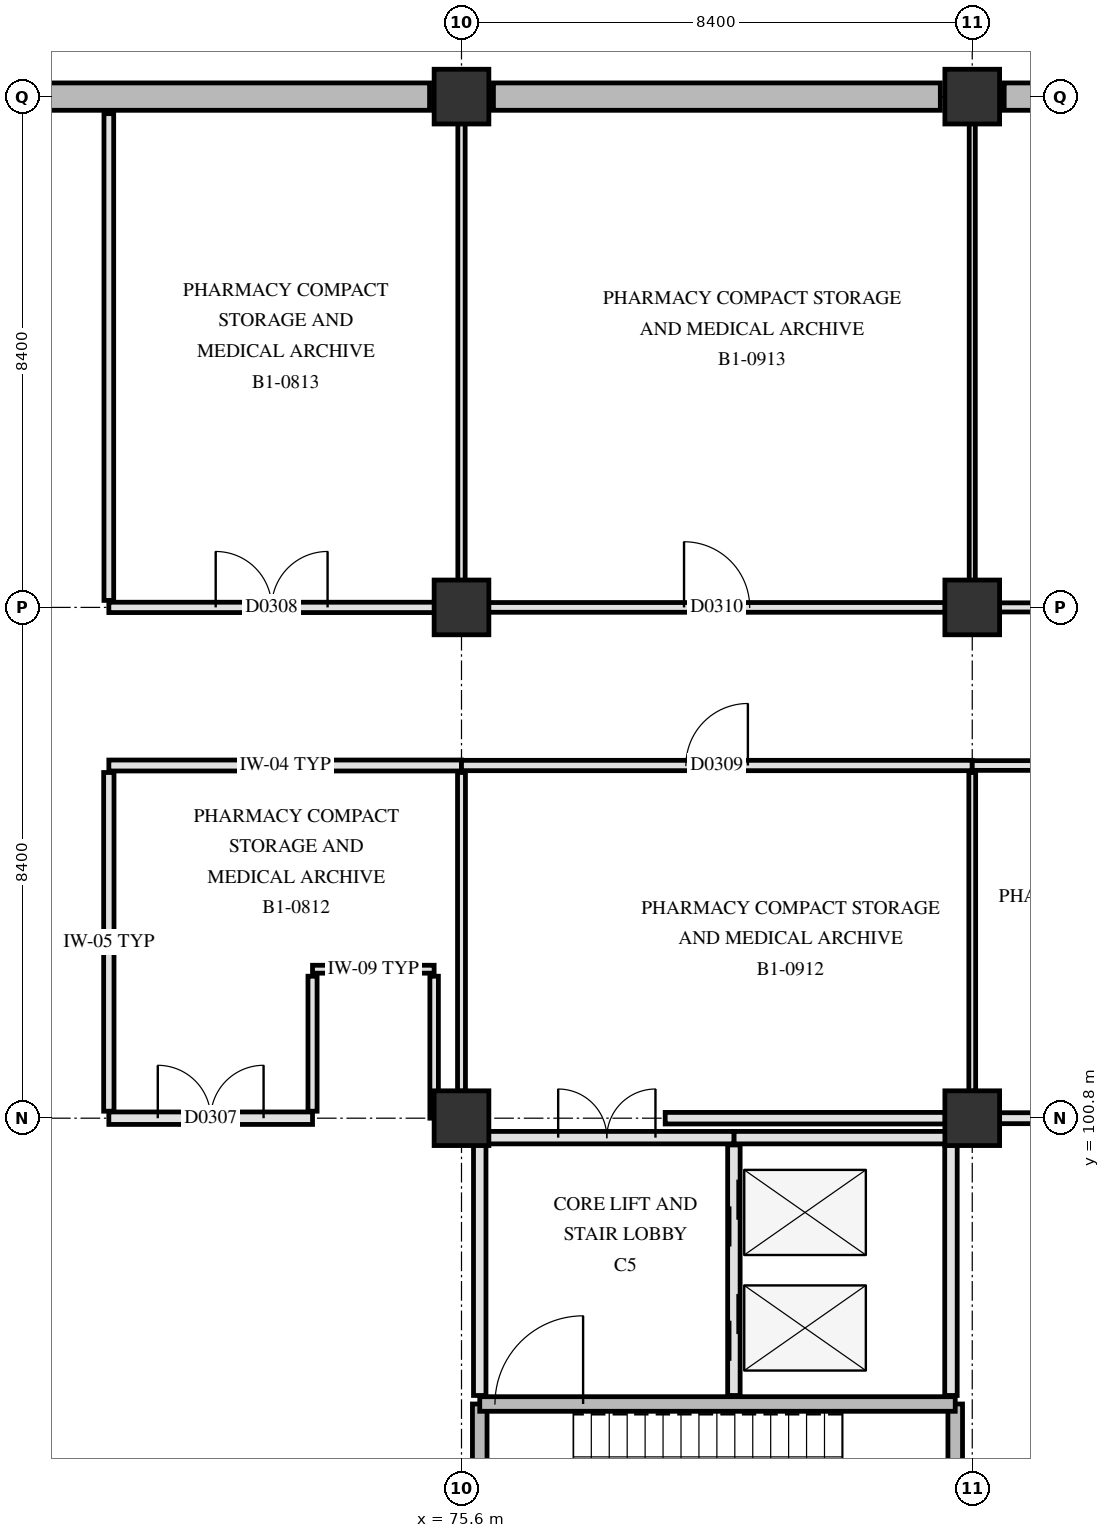
"""IFC4 building model, lengths in metres.
Left out: names, types, materials, properties, quantities, classifications, styles, units other than length and angle.
Written with IfcOpenShell. Run it as: python <this file> out.ifc"""

import sys

from ifc_helpers import new_model, si_unit, direction, frame, frame_2d, origin, origin_2d, place, context, subcontext, project, spatial, rectangle, extrude, element, fill, save


model = new_model("IFC4")
c1 = context("Model", 3, precision=1e-05, world=origin(), true_north=direction((0.0, 1.0)))
c2 = subcontext(c1, "Body", "Model", "MODEL_VIEW")
j1 = project(units=[si_unit("LENGTHUNIT", "METRE"), si_unit("PLANEANGLEUNIT", "RADIAN")], contexts=[c1])
p1 = place(None, origin())
s1 = spatial("IfcSite", under=j1, at=p1, CompositionType="ELEMENT")
p2 = place(p1, origin())
s2 = spatial("IfcBuilding", under=s1, at=p2, CompositionType="ELEMENT")
p3 = place(p2, frame((0.0, 0.0, -5.4)))
s3 = spatial("IfcBuildingStorey", under=s2, at=p3, CompositionType="ELEMENT", Elevation=-5.4)
for number, where, z_axis, x_axis in (
    (1, (75.6, 100.8, 0.0), (0.0, 0.0, 1.0), (1.0, 0.0, 0.0)),
    (2, (75.6, 109.2, 0.0), (0.0, 0.0, 1.0), (1.0, 0.0, 0.0)),
    (3, (75.6, 117.6, 0.0), (0.0, 0.0, 1.0), (1.0, 0.0, 0.0)),
    (4, (84.0, 100.8, 0.0), (0.0, 0.0, 1.0), (1.0, 0.0, 0.0)),
    (5, (84.0, 109.2, 0.0), (0.0, 0.0, 1.0), (1.0, 0.0, 0.0)),
    (6, (84.0, 117.6, 0.0), (0.0, 0.0, 1.0), (1.0, 0.0, 0.0)),
):
    element("IfcColumn", number, at=place(p3, frame(where, z_axis=z_axis, x_axis=x_axis)), inside=s3, PredefinedType="COLUMN", context=c2, shape_type="SweptSolid", body=[
        extrude(rectangle(XDim=0.9, YDim=0.9, at=origin_2d()), origin(), (0.0, 0.0, 1.0), 5.4),
    ])
p4 = place(p3, frame((67.725, 117.6, 0.0), z_axis=(0.0, 0.0, 1.0), x_axis=(1.0, 0.0, 0.0)))
e7 = element("IfcWall", 7, at=p4, inside=s3, PredefinedType="SOLIDWALL", context=c2, shape_type="SweptSolid", body=[
    extrude(rectangle(XDim=7.35, YDim=0.45, at=frame_2d((3.675, 0.0))), origin(), (0.0, 0.0, 1.0), 5.08),
])
for number, where, z_axis, x_axis in (
    (8, (76.125, 117.6, 0.0), (0.0, 0.0, 1.0), (1.0, 0.0, 0.0)),
    (9, (84.525, 117.6, 0.0), (0.0, 0.0, 1.0), (1.0, 0.0, 0.0)),
):
    element("IfcWall", number, at=place(p3, frame(where, z_axis=z_axis, x_axis=x_axis)), inside=s3, PredefinedType="SOLIDWALL", context=c2, shape_type="SweptSolid", body=[
        extrude(rectangle(XDim=7.35, YDim=0.45, at=frame_2d((3.675, 0.0))), origin(), (0.0, 0.0, 1.0), 5.08),
    ])
for number, where, z_axis, x_axis in (
    (10, (75.9, 92.78, 0.0), (0.0, 0.0, 1.0), (0.0, 1.0, 0.0)),
    (11, (83.72, 92.78, 0.0), (0.0, 0.0, 1.0), (0.0, 1.0, 0.0)),
):
    element("IfcWall", number, at=place(p3, frame(where, z_axis=z_axis, x_axis=x_axis)), inside=s3, PredefinedType="SHEAR", context=c2, shape_type="SweptSolid", body=[
        extrude(rectangle(XDim=3.32, YDim=0.24, at=frame_2d((1.66, 0.0))), origin(), (0.0, 0.0, 1.0), 5.08),
    ])
p5 = place(p3, frame((75.9, 96.1, 0.0), z_axis=(0.0, 0.0, 1.0), x_axis=(1.0, 0.0, 0.0)))
e12 = element("IfcWall", 12, at=p5, inside=s3, PredefinedType="SHEAR", context=c2, shape_type="SweptSolid", body=[
    extrude(rectangle(XDim=7.82, YDim=0.24, at=frame_2d((3.91, 0.0))), origin(), (0.0, 0.0, 1.0), 5.08),
])
p6 = place(p5, frame((0.25, 0.0, 0.0)))
e13 = element("IfcOpeningElement", 13, at=p6, cuts=e12, PredefinedType="OPENING", context=c2, shape_type="SweptSolid", body=[
    extrude(rectangle(XDim=1.45, YDim=2.2, at=frame_2d((0.725, 1.1))), frame((0.0, 0.13, 0.0), z_axis=(0.0, -1.0, 0.0), x_axis=(1.0, 0.0, 0.0)), (0.0, 0.0, 1.0), 0.26),
])
p7 = place(p3, frame((80.08, 96.24, 0.0), z_axis=(0.0, 0.0, 1.0), x_axis=(0.0, 1.0, 0.0)))
e14 = element("IfcWall", 14, at=p7, inside=s3, PredefinedType="PARTITIONING", context=c2, shape_type="SweptSolid", body=[
    extrude(rectangle(XDim=4.12, YDim=0.205, at=frame_2d((2.06, 0.0))), origin(), (0.0, 0.0, 1.0), 5.07),
])
p8 = place(p7, frame((0.57, 0.0, 0.0)))
e15 = element("IfcOpeningElement", 15, at=p8, cuts=e14, PredefinedType="OPENING", context=c2, shape_type="SweptSolid", body=[
    extrude(rectangle(XDim=1.1, YDim=2.15, at=frame_2d((0.55, 1.075))), frame((0.0, 0.113, 0.0), z_axis=(0.0, -1.0, 0.0), x_axis=(1.0, 0.0, 0.0)), (0.0, 0.0, 1.0), 0.225),
])
p9 = place(p7, frame((2.45, 0.0, 0.0)))
e16 = element("IfcOpeningElement", 16, at=p9, cuts=e14, PredefinedType="OPENING", context=c2, shape_type="SweptSolid", body=[
    extrude(rectangle(XDim=1.1, YDim=2.15, at=frame_2d((0.55, 1.075))), frame((0.0, 0.113, 0.0), z_axis=(0.0, -1.0, 0.0), x_axis=(1.0, 0.0, 0.0)), (0.0, 0.0, 1.0), 0.225),
])
p10 = place(p3, frame((83.65, 96.24, 0.0), z_axis=(0.0, 0.0, 1.0), x_axis=(0.0, 1.0, 0.0)))
e17 = element("IfcWall", 17, at=p10, inside=s3, PredefinedType="PARTITIONING", context=c2, shape_type="SweptSolid", body=[
    extrude(rectangle(XDim=4.12, YDim=0.205, at=frame_2d((2.06, 0.0))), origin(), (0.0, 0.0, 1.0), 5.07),
])
p11 = place(p3, frame((80.08, 100.48, 0.0), z_axis=(0.0, 0.0, 1.0), x_axis=(1.0, 0.0, 0.0)))
e18 = element("IfcWall", 18, at=p11, inside=s3, PredefinedType="PARTITIONING", context=c2, shape_type="SweptSolid", body=[
    extrude(rectangle(XDim=3.57, YDim=0.205, at=frame_2d((1.785, 0.0))), origin(), (0.0, 0.0, 1.0), 4.42),
])
p12 = place(p3, frame((75.9, 96.24, 0.0), z_axis=(0.0, 0.0, 1.0), x_axis=(0.0, 1.0, 0.0)))
e19 = element("IfcWall", 19, at=p12, inside=s3, PredefinedType="PARTITIONING", context=c2, shape_type="SweptSolid", body=[
    extrude(rectangle(XDim=4.12, YDim=0.205, at=frame_2d((2.06, 0.0))), origin(), (0.0, 0.0, 1.0), 4.47),
])
p13 = place(p3, frame((75.9, 100.48, 0.0), z_axis=(0.0, 0.0, 1.0), x_axis=(1.0, 0.0, 0.0)))
e20 = element("IfcWall", 20, at=p13, inside=s3, PredefinedType="PARTITIONING", context=c2, shape_type="SweptSolid", body=[
    extrude(rectangle(XDim=4.18, YDim=0.205, at=frame_2d((2.09, 0.0))), origin(), (0.0, 0.0, 1.0), 4.42),
])
p14 = place(p13, frame((1.29, 0.0, 0.0)))
e21 = element("IfcOpeningElement", 21, at=p14, cuts=e20, PredefinedType="OPENING", context=c2, shape_type="SweptSolid", body=[
    extrude(rectangle(XDim=1.6, YDim=2.25, at=frame_2d((0.8, 1.125))), frame((0.0, 0.113, 0.0), z_axis=(0.0, -1.0, 0.0), x_axis=(1.0, 0.0, 0.0)), (0.0, 0.0, 1.0), 0.225),
])
p15 = place(p3, frame((69.8, 100.8, 0.0), z_axis=(0.0, 0.0, 1.0), x_axis=(1.0, 0.0, 0.0)))
e22 = element("IfcWall", 22, at=p15, inside=s3, PredefinedType="PARTITIONING", context=c2, shape_type="SweptSolid", body=[
    extrude(rectangle(XDim=3.35, YDim=0.205, at=frame_2d((1.675, 0.0))), origin(), (0.0, 0.0, 1.0), 4.42),
])
p16 = place(p15, frame((0.805, 0.0, 0.0)))
e23 = element("IfcOpeningElement", 23, at=p16, cuts=e22, PredefinedType="OPENING", context=c2, shape_type="SweptSolid", body=[
    extrude(rectangle(XDim=1.74, YDim=2.24, at=frame_2d((0.87, 1.12))), frame((0.0, 0.113, 0.0), z_axis=(0.0, -1.0, 0.0), x_axis=(1.0, 0.0, 0.0)), (0.0, 0.0, 1.0), 0.225),
])
p17 = place(p3, frame((78.95, 100.8, 0.0), z_axis=(0.0, 0.0, 1.0), x_axis=(1.0, 0.0, 0.0)))
e24 = element("IfcWall", 24, at=p17, inside=s3, PredefinedType="PARTITIONING", context=c2, shape_type="SweptSolid", body=[
    extrude(rectangle(XDim=4.605, YDim=0.19, at=frame_2d((2.302, 0.0))), origin(), (0.0, 0.0, 1.0), 4.42),
])
p18 = place(p3, frame((84.445, 100.8, 0.0), z_axis=(0.0, 0.0, 1.0), x_axis=(1.0, 0.0, 0.0)))
e25 = element("IfcWall", 25, at=p18, inside=s3, PredefinedType="PARTITIONING", context=c2, shape_type="SweptSolid", body=[
    extrude(rectangle(XDim=7.51, YDim=0.18, at=frame_2d((3.755, 0.0))), origin(), (0.0, 0.0, 1.0), 4.42),
])
p19 = place(p18, frame((3.145, 0.0, 0.0)))
e26 = element("IfcOpeningElement", 26, at=p19, cuts=e25, PredefinedType="OPENING", context=c2, shape_type="SweptSolid", body=[
    extrude(rectangle(XDim=1.22, YDim=2.18, at=frame_2d((0.61, 1.09))), frame((0.0, 0.1, 0.0), z_axis=(0.0, -1.0, 0.0), x_axis=(1.0, 0.0, 0.0)), (0.0, 0.0, 1.0), 0.2),
])
p20 = place(p3, frame((73.15, 103.25, 0.0), z_axis=(0.0, 0.0, 1.0), x_axis=(1.0, 0.0, 0.0)))
e27 = element("IfcWall", 27, at=p20, inside=s3, PredefinedType="PARTITIONING", context=c2, shape_type="SweptSolid", body=[
    extrude(rectangle(XDim=2.0, YDim=0.13, at=frame_2d((1.0, 0.0))), origin(), (0.0, 0.0, 1.0), 5.07),
])
p21 = place(p3, frame((69.8, 106.6, 0.0), z_axis=(0.0, 0.0, 1.0), x_axis=(1.0, 0.0, 0.0)))
e28 = element("IfcWall", 28, at=p21, inside=s3, PredefinedType="PARTITIONING", context=c2, shape_type="SweptSolid", body=[
    extrude(rectangle(XDim=5.8, YDim=0.18, at=frame_2d((2.9, 0.0))), origin(), (0.0, 0.0, 1.0), 4.47),
])
p22 = place(p3, frame((75.6, 106.6, 0.0), z_axis=(0.0, 0.0, 1.0), x_axis=(1.0, 0.0, 0.0)))
e29 = element("IfcWall", 29, at=p22, inside=s3, PredefinedType="PARTITIONING", context=c2, shape_type="SweptSolid", body=[
    extrude(rectangle(XDim=8.4, YDim=0.17, at=frame_2d((4.2, 0.0))), origin(), (0.0, 0.0, 1.0), 4.47),
])
p23 = place(p22, frame((3.69, 0.0, 0.0)))
e30 = element("IfcOpeningElement", 30, at=p23, cuts=e29, PredefinedType="OPENING", context=c2, shape_type="SweptSolid", body=[
    extrude(rectangle(XDim=1.02, YDim=2.12, at=frame_2d((0.51, 1.06))), frame((0.0, 0.095, 0.0), z_axis=(0.0, -1.0, 0.0), x_axis=(1.0, 0.0, 0.0)), (0.0, 0.0, 1.0), 0.19),
])
p24 = place(p3, frame((84.0, 106.6, 0.0), z_axis=(0.0, 0.0, 1.0), x_axis=(1.0, 0.0, 0.0)))
e31 = element("IfcWall", 31, at=p24, inside=s3, PredefinedType="PARTITIONING", context=c2, shape_type="SweptSolid", body=[
    extrude(rectangle(XDim=8.4, YDim=0.16, at=frame_2d((4.2, 0.0))), origin(), (0.0, 0.0, 1.0), 4.47),
])
p25 = place(p3, frame((69.8, 109.2, 0.0), z_axis=(0.0, 0.0, 1.0), x_axis=(1.0, 0.0, 0.0)))
e32 = element("IfcWall", 32, at=p25, inside=s3, PredefinedType="PARTITIONING", context=c2, shape_type="SweptSolid", body=[
    extrude(rectangle(XDim=5.355, YDim=0.17, at=frame_2d((2.677, 0.0))), origin(), (0.0, 0.0, 1.0), 4.42),
])
p26 = place(p25, frame((1.758, 0.0, 0.0)))
e33 = element("IfcOpeningElement", 33, at=p26, cuts=e32, PredefinedType="OPENING", context=c2, shape_type="SweptSolid", body=[
    extrude(rectangle(XDim=1.84, YDim=2.28, at=frame_2d((0.92, 1.14))), frame((0.0, 0.095, 0.0), z_axis=(0.0, -1.0, 0.0), x_axis=(1.0, 0.0, 0.0)), (0.0, 0.0, 1.0), 0.19),
])
p27 = place(p3, frame((76.045, 109.2, 0.0), z_axis=(0.0, 0.0, 1.0), x_axis=(1.0, 0.0, 0.0)))
e34 = element("IfcWall", 34, at=p27, inside=s3, PredefinedType="PARTITIONING", context=c2, shape_type="SweptSolid", body=[
    extrude(rectangle(XDim=7.51, YDim=0.16, at=frame_2d((3.755, 0.0))), origin(), (0.0, 0.0, 1.0), 4.42),
])
p28 = place(p27, frame((3.215, 0.0, 0.0)))
e35 = element("IfcOpeningElement", 35, at=p28, cuts=e34, PredefinedType="OPENING", context=c2, shape_type="SweptSolid", body=[
    extrude(rectangle(XDim=1.08, YDim=2.12, at=frame_2d((0.54, 1.06))), frame((0.0, 0.09, 0.0), z_axis=(0.0, -1.0, 0.0), x_axis=(1.0, 0.0, 0.0)), (0.0, 0.0, 1.0), 0.18),
])
p29 = place(p3, frame((84.445, 109.2, 0.0), z_axis=(0.0, 0.0, 1.0), x_axis=(1.0, 0.0, 0.0)))
e36 = element("IfcWall", 36, at=p29, inside=s3, PredefinedType="PARTITIONING", context=c2, shape_type="SweptSolid", body=[
    extrude(rectangle(XDim=7.51, YDim=0.15, at=frame_2d((3.755, 0.0))), origin(), (0.0, 0.0, 1.0), 4.42),
])
p30 = place(p29, frame((3.095, 0.0, 0.0)))
e37 = element("IfcOpeningElement", 37, at=p30, cuts=e36, PredefinedType="OPENING", context=c2, shape_type="SweptSolid", body=[
    extrude(rectangle(XDim=1.32, YDim=2.18, at=frame_2d((0.66, 1.09))), frame((0.0, 0.085, 0.0), z_axis=(0.0, -1.0, 0.0), x_axis=(1.0, 0.0, 0.0)), (0.0, 0.0, 1.0), 0.17),
])
p31 = place(p3, frame((69.8, 100.915, 0.0), z_axis=(0.0, 0.0, 1.0), x_axis=(0.0, 1.0, 0.0)))
e38 = element("IfcWall", 38, at=p31, inside=s3, PredefinedType="PARTITIONING", context=c2, shape_type="SweptSolid", body=[
    extrude(rectangle(XDim=5.57, YDim=0.17, at=frame_2d((2.785, 0.0))), origin(), (0.0, 0.0, 1.0), 4.42),
])
p32 = place(p3, frame((69.8, 109.315, 0.0), z_axis=(0.0, 0.0, 1.0), x_axis=(0.0, 1.0, 0.0)))
e39 = element("IfcWall", 39, at=p32, inside=s3, PredefinedType="PARTITIONING", context=c2, shape_type="SweptSolid", body=[
    extrude(rectangle(XDim=8.005, YDim=0.16, at=frame_2d((4.002, 0.0))), origin(), (0.0, 0.0, 1.0), 4.42),
])
p33 = place(p3, frame((73.15, 100.915, 0.0), z_axis=(0.0, 0.0, 1.0), x_axis=(0.0, 1.0, 0.0)))
e40 = element("IfcWall", 40, at=p33, inside=s3, PredefinedType="PARTITIONING", context=c2, shape_type="SweptSolid", body=[
    extrude(rectangle(XDim=2.22, YDim=0.15, at=frame_2d((1.11, 0.0))), origin(), (0.0, 0.0, 1.0), 4.42),
])
p34 = place(p3, frame((75.15, 100.8, 0.0), z_axis=(0.0, 0.0, 1.0), x_axis=(0.0, 1.0, 0.0)))
e41 = element("IfcWall", 41, at=p34, inside=s3, PredefinedType="PARTITIONING", context=c2, shape_type="SweptSolid", body=[
    extrude(rectangle(XDim=2.335, YDim=0.14, at=frame_2d((1.167, 0.0))), origin(), (0.0, 0.0, 1.0), 4.42),
])
p35 = place(p3, frame((75.6, 101.245, 0.0), z_axis=(0.0, 0.0, 1.0), x_axis=(0.0, 1.0, 0.0)))
e42 = element("IfcWall", 42, at=p35, inside=s3, PredefinedType="PARTITIONING", context=c2, shape_type="SweptSolid", body=[
    extrude(rectangle(XDim=5.24, YDim=0.13, at=frame_2d((2.62, 0.0))), origin(), (0.0, 0.0, 1.0), 4.47),
])
p36 = place(p3, frame((75.6, 109.645, 0.0), z_axis=(0.0, 0.0, 1.0), x_axis=(0.0, 1.0, 0.0)))
e43 = element("IfcWall", 43, at=p36, inside=s3, PredefinedType="PARTITIONING", context=c2, shape_type="SweptSolid", body=[
    extrude(rectangle(XDim=7.51, YDim=0.12, at=frame_2d((3.755, 0.0))), origin(), (0.0, 0.0, 1.0), 4.47),
])
p37 = place(p3, frame((84.0, 101.245, 0.0), z_axis=(0.0, 0.0, 1.0), x_axis=(0.0, 1.0, 0.0)))
e44 = element("IfcWall", 44, at=p37, inside=s3, PredefinedType="PARTITIONING", context=c2, shape_type="SweptSolid", body=[
    extrude(rectangle(XDim=5.24, YDim=0.112, at=frame_2d((2.62, 0.0))), origin(), (0.0, 0.0, 1.0), 4.47),
])
p38 = place(p3, frame((84.0, 109.645, 0.0), z_axis=(0.0, 0.0, 1.0), x_axis=(0.0, 1.0, 0.0)))
e45 = element("IfcWall", 45, at=p38, inside=s3, PredefinedType="PARTITIONING", context=c2, shape_type="SweptSolid", body=[
    extrude(rectangle(XDim=7.51, YDim=0.1, at=frame_2d((3.755, 0.0))), origin(), (0.0, 0.0, 1.0), 4.47),
])
p39 = place(p6, origin())
e46 = element("IfcDoor", 46, at=p39, inside=s3, OperationType="SINGLE_SWING_RIGHT", PredefinedType="DOOR", context=c2, shape_type="SweptSolid", body=[
    extrude(rectangle(XDim=1.45, YDim=2.2, at=frame_2d((0.725, 1.1))), frame((0.0, 0.025, 0.0), z_axis=(0.0, -1.0, 0.0), x_axis=(1.0, 0.0, 0.0)), (0.0, 0.0, 1.0), 0.05),
])
fill(e13, e46)
p40 = place(p8, origin())
e47 = element("IfcDoor", 47, at=p40, inside=s3, OperationType="SLIDING_TO_LEFT", PredefinedType="DOOR", context=c2, shape_type="SweptSolid", body=[
    extrude(rectangle(XDim=1.1, YDim=2.15, at=frame_2d((0.55, 1.075))), frame((0.0, 0.025, 0.0), z_axis=(0.0, -1.0, 0.0), x_axis=(1.0, 0.0, 0.0)), (0.0, 0.0, 1.0), 0.05),
])
fill(e15, e47)
p41 = place(p9, origin())
e48 = element("IfcDoor", 48, at=p41, inside=s3, OperationType="SLIDING_TO_LEFT", PredefinedType="DOOR", context=c2, shape_type="SweptSolid", body=[
    extrude(rectangle(XDim=1.1, YDim=2.15, at=frame_2d((0.55, 1.075))), frame((0.0, 0.025, 0.0), z_axis=(0.0, -1.0, 0.0), x_axis=(1.0, 0.0, 0.0)), (0.0, 0.0, 1.0), 0.05),
])
fill(e16, e48)
p42 = place(p14, origin())
e49 = element("IfcDoor", 49, at=p42, inside=s3, OperationType="DOUBLE_SWING_LEFT", PredefinedType="DOOR", context=c2, shape_type="SweptSolid", body=[
    extrude(rectangle(XDim=1.6, YDim=2.25, at=frame_2d((0.8, 1.125))), frame((0.0, 0.025, 0.0), z_axis=(0.0, -1.0, 0.0), x_axis=(1.0, 0.0, 0.0)), (0.0, 0.0, 1.0), 0.05),
])
fill(e21, e49)
p43 = place(p16, origin())
e50 = element("IfcDoor", 50, at=p43, inside=s3, OperationType="DOUBLE_SWING_RIGHT", PredefinedType="DOOR", context=c2, shape_type="SweptSolid", body=[
    extrude(rectangle(XDim=1.74, YDim=2.24, at=frame_2d((0.87, 1.12))), frame((0.0, 0.025, 0.0), z_axis=(0.0, -1.0, 0.0), x_axis=(1.0, 0.0, 0.0)), (0.0, 0.0, 1.0), 0.05),
])
fill(e23, e50)
p44 = place(p26, origin())
e51 = element("IfcDoor", 51, at=p44, inside=s3, OperationType="DOUBLE_SWING_LEFT", PredefinedType="DOOR", context=c2, shape_type="SweptSolid", body=[
    extrude(rectangle(XDim=1.84, YDim=2.28, at=frame_2d((0.92, 1.14))), frame((0.0, 0.025, 0.0), z_axis=(0.0, -1.0, 0.0), x_axis=(1.0, 0.0, 0.0)), (0.0, 0.0, 1.0), 0.05),
])
fill(e33, e51)
p45 = place(p23, origin())
e52 = element("IfcDoor", 52, at=p45, inside=s3, OperationType="SINGLE_SWING_RIGHT", PredefinedType="DOOR", context=c2, shape_type="SweptSolid", body=[
    extrude(rectangle(XDim=1.02, YDim=2.12, at=frame_2d((0.51, 1.06))), frame((0.0, 0.025, 0.0), z_axis=(0.0, -1.0, 0.0), x_axis=(1.0, 0.0, 0.0)), (0.0, 0.0, 1.0), 0.05),
])
fill(e30, e52)
p46 = place(p28, origin())
e53 = element("IfcDoor", 53, at=p46, inside=s3, OperationType="SINGLE_SWING_LEFT", PredefinedType="DOOR", context=c2, shape_type="SweptSolid", body=[
    extrude(rectangle(XDim=1.08, YDim=2.12, at=frame_2d((0.54, 1.06))), frame((0.0, 0.025, 0.0), z_axis=(0.0, -1.0, 0.0), x_axis=(1.0, 0.0, 0.0)), (0.0, 0.0, 1.0), 0.05),
])
fill(e35, e53)
save(model, sys.argv[1])
